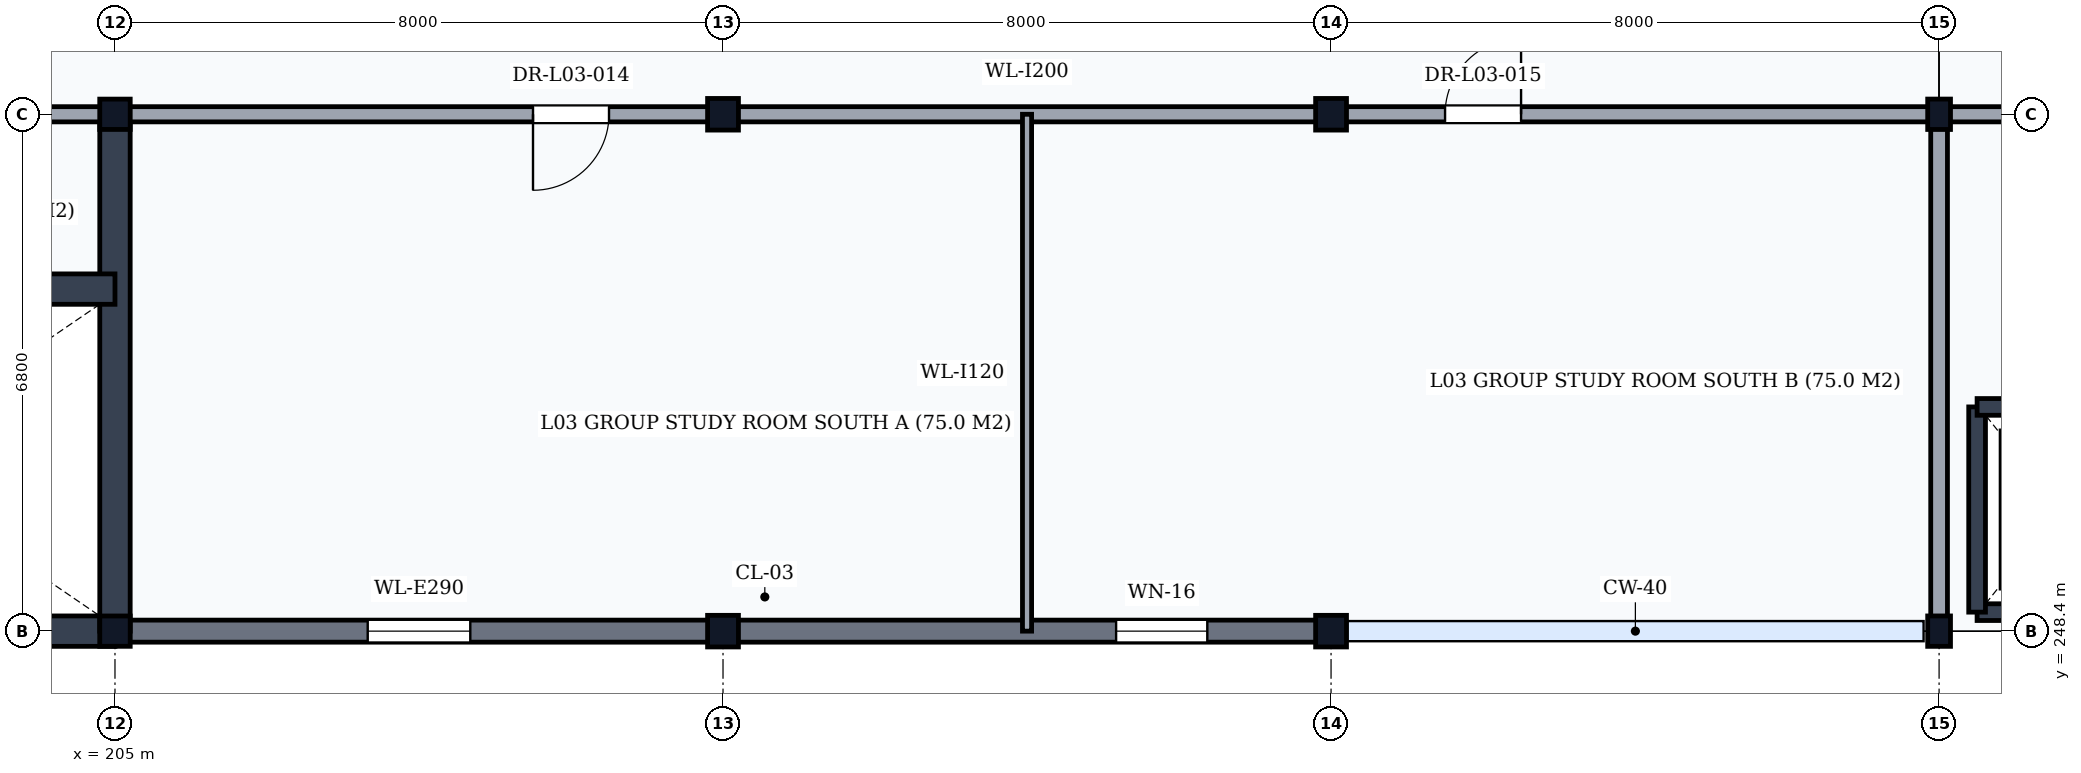
"""IFC4 building model, lengths in metres.
Left out: names, types, materials, properties, quantities, classifications, styles, units other than length and angle.
Written with IfcOpenShell. Run it as: python <this file> out.ifc"""

import sys

from ifc_helpers import new_model, si_unit, direction, frame, frame_2d, origin, origin_2d, place, context, subcontext, project, spatial, rectangle, i_section, extrude, element, fill, save


model = new_model("IFC4")
c1 = context("Model", 3, precision=1e-05, world=origin(), true_north=direction((0.0, 1.0)))
c2 = subcontext(c1, "Body", "Model", "MODEL_VIEW")
j1 = project(units=[si_unit("LENGTHUNIT", "METRE"), si_unit("PLANEANGLEUNIT", "RADIAN")], contexts=[c1])
p1 = place(None, origin())
s1 = spatial("IfcSite", under=j1, at=p1, CompositionType="ELEMENT")
p2 = place(p1, origin())
s2 = spatial("IfcBuilding", under=s1, at=p2, CompositionType="ELEMENT")
p3 = place(p2, frame((0.0, 0.0, 10.5)))
s3 = spatial("IfcBuildingStorey", under=s2, at=p3, CompositionType="ELEMENT", Elevation=10.5)
for number, where, z_axis, x_axis in (
    (1, (205.0, 248.4, 0.0), (0.0, 0.0, 1.0), (1.0, 0.0, 0.0)),
    (2, (205.0, 255.2, 0.0), (0.0, 0.0, 1.0), (1.0, 0.0, 0.0)),
):
    element("IfcColumn", number, at=place(p3, frame(where, z_axis=z_axis, x_axis=x_axis)), inside=s3, PredefinedType="COLUMN", context=c2, shape_type="SweptSolid", body=[
        extrude(i_section(OverallWidth=0.401, OverallDepth=0.399, WebThickness=0.025, FlangeThickness=0.04, FilletRadius=0.015, at=origin_2d()), origin(), (0.0, 0.0, 1.0), 5.1),
    ])
for number, where, z_axis, x_axis in (
    (3, (213.0, 248.4, 0.0), (0.0, 0.0, 1.0), (1.0, 0.0, 0.0)),
    (4, (213.0, 255.2, 0.0), (0.0, 0.0, 1.0), (1.0, 0.0, 0.0)),
    (5, (221.0, 248.4, 0.0), (0.0, 0.0, 1.0), (1.0, 0.0, 0.0)),
    (6, (221.0, 255.2, 0.0), (0.0, 0.0, 1.0), (1.0, 0.0, 0.0)),
):
    element("IfcColumn", number, at=place(p3, frame(where, z_axis=z_axis, x_axis=x_axis)), inside=s3, PredefinedType="COLUMN", context=c2, shape_type="SweptSolid", body=[
        extrude(i_section(OverallWidth=0.406, OverallDepth=0.416, WebThickness=0.03, FlangeThickness=0.048, FilletRadius=0.015, at=origin_2d()), origin(), (0.0, 0.0, 1.0), 5.1),
    ])
for number, where, z_axis, x_axis in (
    (7, (229.0, 248.4, 0.0), (0.0, 0.0, 1.0), (1.0, 0.0, 0.0)),
    (8, (229.0, 255.2, 0.0), (0.0, 0.0, 1.0), (1.0, 0.0, 0.0)),
):
    element("IfcColumn", number, at=place(p3, frame(where, z_axis=z_axis, x_axis=x_axis)), inside=s3, PredefinedType="COLUMN", context=c2, shape_type="SweptSolid", body=[
        extrude(i_section(OverallWidth=0.3, OverallDepth=0.4, WebThickness=0.013, FlangeThickness=0.024, FilletRadius=0.027, at=origin_2d()), origin(), (0.0, 0.0, 1.0), 5.1),
    ])
p4 = place(p3, frame((205.006, 248.4, 0.0), z_axis=(0.0, 0.0, 1.0), x_axis=(1.0, 0.0, 0.0)))
e9 = element("IfcWall", 9, at=p4, inside=s3, PredefinedType="SOLIDWALL", context=c2, shape_type="SweptSolid", body=[
    extrude(rectangle(XDim=7.988, YDim=0.29, at=frame_2d((3.994, 0.0))), origin(), (0.0, 0.0, 1.0), 4.528),
])
p5 = place(p4, frame((3.319, 0.0, 0.95)))
e10 = element("IfcOpeningElement", 10, at=p5, cuts=e9, PredefinedType="OPENING", context=c2, shape_type="SweptSolid", body=[
    extrude(rectangle(XDim=1.35, YDim=1.8, at=frame_2d((0.675, 0.9))), frame((0.0, 0.16, 0.0), z_axis=(0.0, -1.0, 0.0), x_axis=(1.0, 0.0, 0.0)), (0.0, 0.0, 1.0), 0.32),
])
p6 = place(p3, frame((213.006, 248.4, 0.0), z_axis=(0.0, 0.0, 1.0), x_axis=(1.0, 0.0, 0.0)))
e11 = element("IfcWall", 11, at=p6, inside=s3, PredefinedType="SOLIDWALL", context=c2, shape_type="SweptSolid", body=[
    extrude(rectangle(XDim=7.988, YDim=0.29, at=frame_2d((3.994, 0.0))), origin(), (0.0, 0.0, 1.0), 4.528),
])
p7 = place(p6, frame((5.166, 0.0, 0.95)))
e12 = element("IfcOpeningElement", 12, at=p7, cuts=e11, PredefinedType="OPENING", context=c2, shape_type="SweptSolid", body=[
    extrude(rectangle(XDim=1.2, YDim=1.8, at=frame_2d((0.6, 0.9))), frame((0.0, 0.16, 0.0), z_axis=(0.0, -1.0, 0.0), x_axis=(1.0, 0.0, 0.0)), (0.0, 0.0, 1.0), 0.32),
])
p8 = place(p3, frame((197.0, 248.4, 0.0), z_axis=(0.0, 0.0, 1.0), x_axis=(1.0, 0.0, 0.0)))
e13 = element("IfcWall", 13, at=p8, inside=s3, PredefinedType="SHEAR", context=c2, shape_type="SweptSolid", body=[
    extrude(rectangle(XDim=8.0, YDim=0.4, at=frame_2d((4.0, 0.0))), origin(), (0.0, 0.0, 1.0), 4.84),
])
p9 = place(p3, frame((205.0, 248.4, 0.0), z_axis=(0.0, 0.0, 1.0), x_axis=(0.0, 1.0, 0.0)))
e14 = element("IfcWall", 14, at=p9, inside=s3, PredefinedType="SHEAR", context=c2, shape_type="SweptSolid", body=[
    extrude(rectangle(XDim=6.8, YDim=0.4, at=frame_2d((3.4, 0.0))), origin(), (0.0, 0.0, 1.0), 4.84),
])
p10 = place(p3, frame((197.0, 252.9, 0.0), z_axis=(0.0, 0.0, 1.0), x_axis=(1.0, 0.0, 0.0)))
e15 = element("IfcWall", 15, at=p10, inside=s3, PredefinedType="SHEAR", context=c2, shape_type="SweptSolid", body=[
    extrude(rectangle(XDim=8.0, YDim=0.4, at=frame_2d((4.0, 0.0))), origin(), (0.0, 0.0, 1.0), 4.84),
])
p11 = place(p10, frame((0.3, 0.0, 0.0)))
e16 = element("IfcOpeningElement", 16, at=p11, cuts=e15, PredefinedType="OPENING", context=c2, shape_type="SweptSolid", body=[
    extrude(rectangle(XDim=1.15, YDim=2.15, at=frame_2d((0.575, 1.075))), frame((0.0, 0.215, 0.0), z_axis=(0.0, -1.0, 0.0), x_axis=(1.0, 0.0, 0.0)), (0.0, 0.0, 1.0), 0.43),
])
p12 = place(p3, frame((197.0, 255.2, 0.0), z_axis=(0.0, 0.0, 1.0), x_axis=(1.0, 0.0, 0.0)))
e17 = element("IfcWall", 17, at=p12, inside=s3, PredefinedType="PARTITIONING", context=c2, shape_type="SweptSolid", body=[
    extrude(rectangle(XDim=8.0, YDim=0.2, at=frame_2d((4.0, 0.0))), origin(), (0.0, 0.0, 1.0), 4.338),
])
p13 = place(p12, frame((3.275, 0.0, 0.0)))
e18 = element("IfcOpeningElement", 18, at=p13, cuts=e17, PredefinedType="OPENING", context=c2, shape_type="SweptSolid", body=[
    extrude(rectangle(XDim=1.45, YDim=2.2, at=frame_2d((0.725, 1.1))), frame((0.0, 0.115, 0.0), z_axis=(0.0, -1.0, 0.0), x_axis=(1.0, 0.0, 0.0)), (0.0, 0.0, 1.0), 0.23),
])
p14 = place(p3, frame((229.5, 248.65, 0.0), z_axis=(0.0, 0.0, 1.0), x_axis=(1.0, 0.0, 0.0)))
e19 = element("IfcWall", 19, at=p14, inside=s3, PredefinedType="SHEAR", context=c2, shape_type="SweptSolid", body=[
    extrude(rectangle(XDim=2.2, YDim=0.22, at=frame_2d((1.1, 0.0))), origin(), (0.0, 0.0, 1.0), 4.84),
])
p15 = place(p3, frame((229.5, 248.65, 0.0), z_axis=(0.0, 0.0, 1.0), x_axis=(0.0, 1.0, 0.0)))
e20 = element("IfcWall", 20, at=p15, inside=s3, PredefinedType="SHEAR", context=c2, shape_type="SweptSolid", body=[
    extrude(rectangle(XDim=2.7, YDim=0.22, at=frame_2d((1.35, 0.0))), origin(), (0.0, 0.0, 1.0), 4.84),
])
p16 = place(p3, frame((229.5, 251.35, 0.0), z_axis=(0.0, 0.0, 1.0), x_axis=(1.0, 0.0, 0.0)))
e21 = element("IfcWall", 21, at=p16, inside=s3, PredefinedType="SHEAR", context=c2, shape_type="SweptSolid", body=[
    extrude(rectangle(XDim=2.2, YDim=0.22, at=frame_2d((1.1, 0.0))), origin(), (0.0, 0.0, 1.0), 4.84),
])
p17 = place(p16, frame((0.5, 0.0, 0.0)))
e22 = element("IfcOpeningElement", 22, at=p17, cuts=e21, PredefinedType="OPENING", context=c2, shape_type="SweptSolid", body=[
    extrude(rectangle(XDim=1.2, YDim=2.2, at=frame_2d((0.6, 1.1))), frame((0.0, 0.125, 0.0), z_axis=(0.0, -1.0, 0.0), x_axis=(1.0, 0.0, 0.0)), (0.0, 0.0, 1.0), 0.25),
])
p18 = place(p3, frame((229.0, 248.4, 0.0), z_axis=(0.0, 0.0, 1.0), x_axis=(0.0, 1.0, 0.0)))
e23 = element("IfcWall", 23, at=p18, inside=s3, PredefinedType="PARTITIONING", context=c2, shape_type="SweptSolid", body=[
    extrude(rectangle(XDim=6.8, YDim=0.22, at=frame_2d((3.4, 0.0))), origin(), (0.0, 0.0, 1.0), 4.478),
])
p19 = place(p3, frame((229.0, 255.2, 0.0), z_axis=(0.0, 0.0, 1.0), x_axis=(1.0, 0.0, 0.0)))
e24 = element("IfcWall", 24, at=p19, inside=s3, PredefinedType="PARTITIONING", context=c2, shape_type="SweptSolid", body=[
    extrude(rectangle(XDim=8.0, YDim=0.2, at=frame_2d((4.0, 0.0))), origin(), (0.0, 0.0, 1.0), 4.388),
])
p20 = place(p19, frame((3.1, 0.0, 0.0)))
e25 = element("IfcOpeningElement", 25, at=p20, cuts=e24, PredefinedType="OPENING", context=c2, shape_type="SweptSolid", body=[
    extrude(rectangle(XDim=1.8, YDim=2.4, at=frame_2d((0.9, 1.2))), frame((0.0, 0.115, 0.0), z_axis=(0.0, -1.0, 0.0), x_axis=(1.0, 0.0, 0.0)), (0.0, 0.0, 1.0), 0.23),
])
p21 = place(p3, frame((205.0, 255.2, 0.0), z_axis=(0.0, 0.0, 1.0), x_axis=(1.0, 0.0, 0.0)))
e26 = element("IfcWall", 26, at=p21, inside=s3, PredefinedType="PARTITIONING", context=c2, shape_type="SweptSolid", body=[
    extrude(rectangle(XDim=24.0, YDim=0.2, at=frame_2d((12.0, 0.0))), origin(), (0.0, 0.0, 1.0), 4.338),
])
p22 = place(p21, frame((5.5, 0.0, 0.0)))
e27 = element("IfcOpeningElement", 27, at=p22, cuts=e26, PredefinedType="OPENING", context=c2, shape_type="SweptSolid", body=[
    extrude(rectangle(XDim=1.0, YDim=2.1, at=frame_2d((0.5, 1.05))), frame((0.0, 0.115, 0.0), z_axis=(0.0, -1.0, 0.0), x_axis=(1.0, 0.0, 0.0)), (0.0, 0.0, 1.0), 0.23),
])
p23 = place(p21, frame((17.5, 0.0, 0.0)))
e28 = element("IfcOpeningElement", 28, at=p23, cuts=e26, PredefinedType="OPENING", context=c2, shape_type="SweptSolid", body=[
    extrude(rectangle(XDim=1.0, YDim=2.1, at=frame_2d((0.5, 1.05))), frame((0.0, 0.115, 0.0), z_axis=(0.0, -1.0, 0.0), x_axis=(1.0, 0.0, 0.0)), (0.0, 0.0, 1.0), 0.23),
])
p24 = place(p3, frame((217.0, 248.4, 0.0), z_axis=(0.0, 0.0, 1.0), x_axis=(0.0, 1.0, 0.0)))
e29 = element("IfcWall", 29, at=p24, inside=s3, PredefinedType="PARTITIONING", context=c2, shape_type="SweptSolid", body=[
    extrude(rectangle(XDim=6.8, YDim=0.12, at=frame_2d((3.4, 0.0))), origin(), (0.0, 0.0, 1.0), 4.598),
])
p25 = place(p5, origin())
e30 = element("IfcWindow", 30, at=p25, inside=s3, PartitioningType="SINGLE_PANEL", PredefinedType="WINDOW", context=c2, shape_type="SweptSolid", body=[
    extrude(rectangle(XDim=1.35, YDim=1.8, at=frame_2d((0.675, 0.9))), frame((0.0, 0.03, 0.0), z_axis=(0.0, -1.0, 0.0), x_axis=(1.0, 0.0, 0.0)), (0.0, 0.0, 1.0), 0.06),
])
fill(e10, e30)
p26 = place(p7, origin())
e31 = element("IfcWindow", 31, at=p26, inside=s3, PartitioningType="SINGLE_PANEL", PredefinedType="WINDOW", context=c2, shape_type="SweptSolid", body=[
    extrude(rectangle(XDim=1.2, YDim=1.8, at=frame_2d((0.6, 0.9))), frame((0.0, 0.03, 0.0), z_axis=(0.0, -1.0, 0.0), x_axis=(1.0, 0.0, 0.0)), (0.0, 0.0, 1.0), 0.06),
])
fill(e12, e31)
p27 = place(p22, frame((1.0, 0.0, 0.0), z_axis=(0.0, 0.0, 1.0), x_axis=(-1.0, 0.0, 0.0)))
e32 = element("IfcDoor", 32, at=p27, inside=s3, OperationType="SINGLE_SWING_RIGHT", PredefinedType="DOOR", context=c2, shape_type="SweptSolid", body=[
    extrude(rectangle(XDim=1.0, YDim=2.1, at=frame_2d((0.5, 1.05))), frame((0.0, 0.025, 0.0), z_axis=(0.0, -1.0, 0.0), x_axis=(1.0, 0.0, 0.0)), (0.0, 0.0, 1.0), 0.05),
])
fill(e27, e32)
p28 = place(p23, frame((1.0, 0.0, 0.0), z_axis=(0.0, 0.0, 1.0), x_axis=(-1.0, 0.0, 0.0)))
e33 = element("IfcDoor", 33, at=p28, inside=s3, OperationType="SINGLE_SWING_LEFT", PredefinedType="DOOR", context=c2, shape_type="SweptSolid", body=[
    extrude(rectangle(XDim=1.0, YDim=2.1, at=frame_2d((0.5, 1.05))), frame((0.0, 0.025, 0.0), z_axis=(0.0, -1.0, 0.0), x_axis=(1.0, 0.0, 0.0)), (0.0, 0.0, 1.0), 0.05),
])
fill(e28, e33)
save(model, sys.argv[1])
